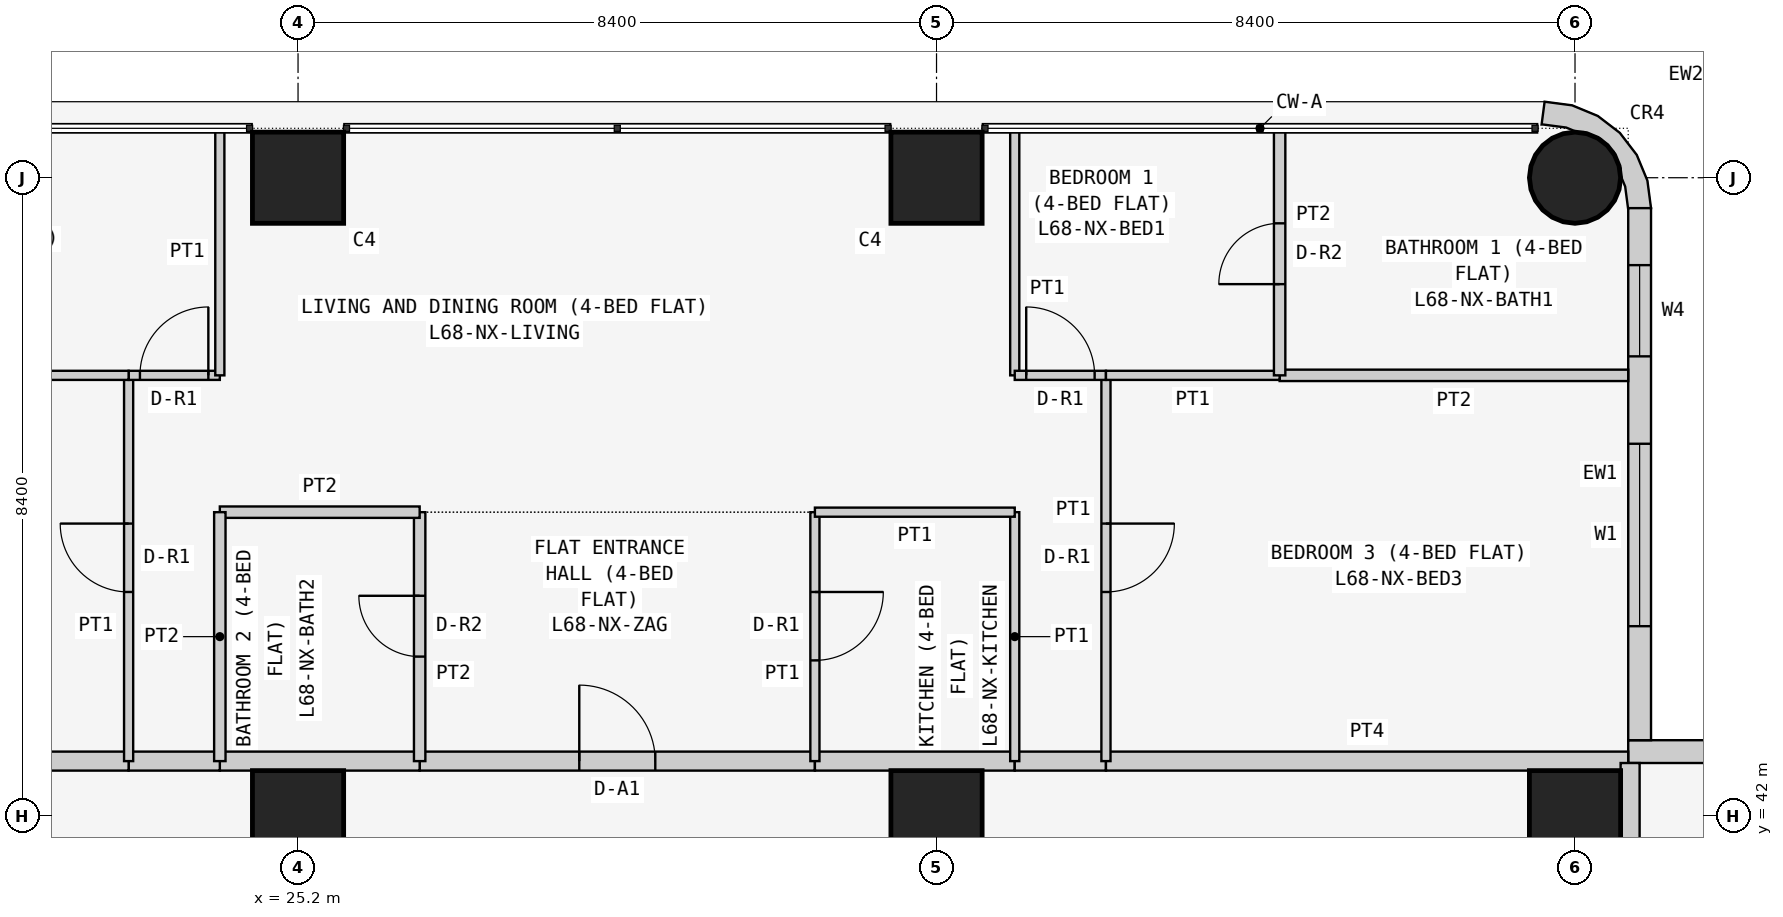
"""IFC4 building model, lengths in metres.
Left out: names, types, materials, properties, quantities, classifications, styles, units other than length and angle.
Written with IfcOpenShell. Run it as: python <this file> out.ifc"""

import sys

from ifc_helpers import new_model, si_unit, direction, frame, frame_2d, origin, origin_2d, place, context, subcontext, project, spatial, polyline, rectangle, circle, outline, extrude, element, fill, save


model = new_model("IFC4")
c1 = context("Model", 3, precision=1e-05, world=origin(), true_north=direction((0.0, 1.0)))
c2 = subcontext(c1, "Body", "Model", "MODEL_VIEW")
j1 = project(units=[si_unit("LENGTHUNIT", "METRE"), si_unit("PLANEANGLEUNIT", "RADIAN")], contexts=[c1])
p1 = place(None, origin())
s1 = spatial("IfcSite", under=j1, at=p1, CompositionType="ELEMENT")
p2 = place(p1, origin())
s2 = spatial("IfcBuilding", under=s1, at=p2, CompositionType="ELEMENT")
p3 = place(p2, frame((0.0, 0.0, 261.3)))
s3 = spatial("IfcBuildingStorey", under=s2, at=p3, CompositionType="ELEMENT", Elevation=261.3)
for number, where, z_axis, x_axis in (
    (1, (25.2, 42.0, 0.0), (0.0, 0.0, 1.0), (1.0, 0.0, 0.0)),
    (2, (25.2, 50.4, 0.0), (0.0, 0.0, 1.0), (1.0, 0.0, 0.0)),
    (3, (33.6, 42.0, 0.0), (0.0, 0.0, 1.0), (1.0, 0.0, 0.0)),
    (4, (33.6, 50.4, 0.0), (0.0, 0.0, 1.0), (1.0, 0.0, 0.0)),
    (5, (42.0, 42.0, 0.0), (0.0, 0.0, 1.0), (1.0, 0.0, 0.0)),
):
    element("IfcColumn", number, at=place(p3, frame(where, z_axis=z_axis, x_axis=x_axis)), inside=s3, PredefinedType="COLUMN", context=c2, shape_type="SweptSolid", body=[
        extrude(rectangle(XDim=1.2, YDim=1.2, at=origin_2d()), origin(), (0.0, 0.0, 1.0), 3.6),
    ])
p4 = place(p3, frame((42.0, 50.4, 0.0), z_axis=(0.0, 0.0, 1.0), x_axis=(1.0, 0.0, 0.0)))
e6 = element("IfcColumn", 6, at=p4, inside=s3, PredefinedType="COLUMN", context=c2, shape_type="SweptSolid", body=[
    extrude(circle(Radius=0.6, at=origin_2d()), origin(), (0.0, 0.0, 1.0), 3.6),
])
p5 = place(p3, frame((50.0, 42.85, 0.0), z_axis=(0.0, 0.0, 1.0), x_axis=(-1.0, 0.0, 0.0)))
e7 = element("IfcWall", 7, at=p5, inside=s3, PredefinedType="SOLIDWALL", context=c2, shape_type="SweptSolid", body=[
    extrude(rectangle(XDim=7.3, YDim=0.3, at=frame_2d((3.65, 0.0))), origin(), (0.0, 0.0, 1.0), 3.45),
])
p6 = place(p5, frame((3.1, 0.0, 0.9)))
e8 = element("IfcOpeningElement", 8, at=p6, cuts=e7, PredefinedType="OPENING", context=c2, shape_type="SweptSolid", body=[
    extrude(rectangle(XDim=2.4, YDim=1.5, at=frame_2d((1.2, 0.75))), frame((0.0, 0.16, 0.0), z_axis=(0.0, -1.0, 0.0), x_axis=(1.0, 0.0, 0.0)), (0.0, 0.0, 1.0), 0.32),
])
p7 = place(p5, frame((0.75, 0.0, 0.9)))
e9 = element("IfcOpeningElement", 9, at=p7, cuts=e7, PredefinedType="OPENING", context=c2, shape_type="SweptSolid", body=[
    extrude(rectangle(XDim=1.2, YDim=1.5, at=frame_2d((0.6, 0.75))), frame((0.0, 0.16, 0.0), z_axis=(0.0, -1.0, 0.0), x_axis=(1.0, 0.0, 0.0)), (0.0, 0.0, 1.0), 0.32),
])
p8 = place(p3, frame((42.85, 43.0, 0.0), z_axis=(0.0, 0.0, 1.0), x_axis=(0.0, 1.0, 0.0)))
e10 = element("IfcWall", 10, at=p8, inside=s3, PredefinedType="SOLIDWALL", context=c2, shape_type="SweptSolid", body=[
    extrude(rectangle(XDim=7.0, YDim=0.3, at=frame_2d((3.5, 0.0))), origin(), (0.0, 0.0, 1.0), 3.45),
])
p9 = place(p8, frame((1.5, 0.0, 0.9)))
e11 = element("IfcOpeningElement", 11, at=p9, cuts=e10, PredefinedType="OPENING", context=c2, shape_type="SweptSolid", body=[
    extrude(rectangle(XDim=2.4, YDim=1.5, at=frame_2d((1.2, 0.75))), frame((0.0, 0.16, 0.0), z_axis=(0.0, -1.0, 0.0), x_axis=(1.0, 0.0, 0.0)), (0.0, 0.0, 1.0), 0.32),
])
p10 = place(p8, frame((5.05, 0.0, 0.9)))
e12 = element("IfcOpeningElement", 12, at=p10, cuts=e10, PredefinedType="OPENING", context=c2, shape_type="SweptSolid", body=[
    extrude(rectangle(XDim=1.2, YDim=1.5, at=frame_2d((0.6, 0.75))), frame((0.0, 0.16, 0.0), z_axis=(0.0, -1.0, 0.0), x_axis=(1.0, 0.0, 0.0)), (0.0, 0.0, 1.0), 0.32),
])
p11 = place(p3, frame((42.576, 50.038, 0.0), z_axis=(0.0, 0.0, 1.0), x_axis=(0.707106781187, 0.707106781187, 0.0)))
e13 = element("IfcWall", 13, at=p11, inside=s3, PredefinedType="SOLIDWALL", context=c2, shape_type="SweptSolid", body=[
    extrude(outline(polyline([(0.233, 0.114), (0.047, -0.129), (0.033, -0.143), (0.273, -0.327), (0.495, -0.037), (0.635, 0.3), (0.683, 0.663), (0.635, 1.025), (0.495, 1.363), (0.273, 1.653), (0.033, 1.469), (0.047, 1.455), (0.233, 1.212), (0.292, 1.069), (0.358, 1.003), (0.449, 0.782), (0.449, 0.543), (0.358, 0.322), (0.292, 0.257), (0.233, 0.114)])), origin(), (0.0, 0.0, 1.0), 3.45),
])
p12 = place(p3, frame((26.8, 42.725, 0.0), z_axis=(0.0, 0.0, 1.0), x_axis=(1.0, 0.0, 0.0)))
e14 = element("IfcWall", 14, at=p12, inside=s3, PredefinedType="PARTITIONING", context=c2, shape_type="SweptSolid", body=[
    extrude(rectangle(XDim=5.2, YDim=0.25, at=frame_2d((2.6, 0.0))), origin(), (0.0, 0.0, 1.0), 3.45),
])
p13 = place(p12, frame((2.1, 0.0, 0.0)))
e15 = element("IfcOpeningElement", 15, at=p13, cuts=e14, PredefinedType="OPENING", context=c2, shape_type="SweptSolid", body=[
    extrude(rectangle(XDim=1.0, YDim=2.1, at=frame_2d((0.5, 1.05))), frame((0.0, 0.135, 0.0), z_axis=(0.0, -1.0, 0.0), x_axis=(1.0, 0.0, 0.0)), (0.0, 0.0, 1.0), 0.27),
])
p14 = place(p3, frame((24.171, 42.725, 0.0), z_axis=(0.0, 0.0, 1.0), x_axis=(1.0, 0.0, 0.0)))
e16 = element("IfcWall", 16, at=p14, inside=s3, PredefinedType="PARTITIONING", context=c2, shape_type="SweptSolid", body=[
    extrude(rectangle(XDim=2.629, YDim=0.25, at=frame_2d((1.314, 0.0))), origin(), (0.0, 0.0, 1.0), 3.45),
])
p15 = place(p3, frame((32.0, 42.725, 0.0), z_axis=(0.0, 0.0, 1.0), x_axis=(1.0, 0.0, 0.0)))
e17 = element("IfcWall", 17, at=p15, inside=s3, PredefinedType="PARTITIONING", context=c2, shape_type="SweptSolid", body=[
    extrude(rectangle(XDim=2.629, YDim=0.25, at=frame_2d((1.314, 0.0))), origin(), (0.0, 0.0, 1.0), 3.45),
])
p16 = place(p3, frame((22.971, 42.725, 0.0), z_axis=(0.0, 0.0, 1.0), x_axis=(1.0, 0.0, 0.0)))
e18 = element("IfcWall", 18, at=p16, inside=s3, PredefinedType="PARTITIONING", context=c2, shape_type="SweptSolid", body=[
    extrude(rectangle(XDim=1.2, YDim=0.25, at=frame_2d((0.6, 0.0))), origin(), (0.0, 0.0, 1.0), 3.45),
])
p17 = place(p3, frame((34.629, 42.725, 0.0), z_axis=(0.0, 0.0, 1.0), x_axis=(1.0, 0.0, 0.0)))
e19 = element("IfcWall", 19, at=p17, inside=s3, PredefinedType="PARTITIONING", context=c2, shape_type="SweptSolid", body=[
    extrude(rectangle(XDim=1.2, YDim=0.25, at=frame_2d((0.6, 0.0))), origin(), (0.0, 0.0, 1.0), 3.45),
])
for number, where, z_axis, x_axis in (
    (20, (16.1, 42.725, 0.0), (0.0, 0.0, 1.0), (1.0, 0.0, 0.0)),
    (21, (35.829, 42.725, 0.0), (0.0, 0.0, 1.0), (1.0, 0.0, 0.0)),
    (22, (42.725, 42.7, 0.0), (0.0, 0.0, 1.0), (0.0, -1.0, 0.0)),
):
    element("IfcWall", number, at=place(p3, frame(where, z_axis=z_axis, x_axis=x_axis)), inside=s3, PredefinedType="PARTITIONING", context=c2, shape_type="SweptSolid", body=[
        extrude(rectangle(XDim=6.871, YDim=0.25, at=frame_2d((3.436, 0.0))), origin(), (0.0, 0.0, 1.0), 3.45),
    ])
p18 = place(p3, frame((26.8, 46.0, 0.0), z_axis=(0.0, 0.0, 1.0), x_axis=(0.0, -1.0, 0.0)))
e23 = element("IfcWall", 23, at=p18, inside=s3, PredefinedType="PARTITIONING", context=c2, shape_type="SweptSolid", body=[
    extrude(rectangle(XDim=3.275, YDim=0.15, at=frame_2d((1.637, 0.0))), origin(), (0.0, 0.0, 1.0), 3.45),
])
p19 = place(p18, frame((1.1, 0.0, 0.0)))
e24 = element("IfcOpeningElement", 24, at=p19, cuts=e23, PredefinedType="OPENING", context=c2, shape_type="SweptSolid", body=[
    extrude(rectangle(XDim=0.8, YDim=2.1, at=frame_2d((0.4, 1.05))), frame((0.0, 0.085, 0.0), z_axis=(0.0, -1.0, 0.0), x_axis=(1.0, 0.0, 0.0)), (0.0, 0.0, 1.0), 0.17),
])
p20 = place(p3, frame((32.0, 42.725, 0.0), z_axis=(0.0, 0.0, 1.0), x_axis=(0.0, 1.0, 0.0)))
e25 = element("IfcWall", 25, at=p20, inside=s3, PredefinedType="PARTITIONING", context=c2, shape_type="SweptSolid", body=[
    extrude(rectangle(XDim=3.275, YDim=0.12, at=frame_2d((1.637, 0.0))), origin(), (0.0, 0.0, 1.0), 3.45),
])
p21 = place(p20, frame((1.325, 0.0, 0.0)))
e26 = element("IfcOpeningElement", 26, at=p21, cuts=e25, PredefinedType="OPENING", context=c2, shape_type="SweptSolid", body=[
    extrude(rectangle(XDim=0.9, YDim=2.1, at=frame_2d((0.45, 1.05))), frame((0.0, 0.07, 0.0), z_axis=(0.0, -1.0, 0.0), x_axis=(1.0, 0.0, 0.0)), (0.0, 0.0, 1.0), 0.14),
])
p22 = place(p3, frame((26.8, 46.0, 0.0), z_axis=(0.0, 0.0, 1.0), x_axis=(-1.0, 0.0, 0.0)))
e27 = element("IfcWall", 27, at=p22, inside=s3, PredefinedType="PARTITIONING", context=c2, shape_type="SweptSolid", body=[
    extrude(rectangle(XDim=2.629, YDim=0.15, at=frame_2d((1.314, 0.0))), origin(), (0.0, 0.0, 1.0), 3.45),
])
p23 = place(p3, frame((24.171, 46.0, 0.0), z_axis=(0.0, 0.0, 1.0), x_axis=(0.0, -1.0, 0.0)))
e28 = element("IfcWall", 28, at=p23, inside=s3, PredefinedType="PARTITIONING", context=c2, shape_type="SweptSolid", body=[
    extrude(rectangle(XDim=3.275, YDim=0.15, at=frame_2d((1.637, 0.0))), origin(), (0.0, 0.0, 1.0), 3.45),
])
p24 = place(p3, frame((34.629, 42.725, 0.0), z_axis=(0.0, 0.0, 1.0), x_axis=(0.0, 1.0, 0.0)))
e29 = element("IfcWall", 29, at=p24, inside=s3, PredefinedType="PARTITIONING", context=c2, shape_type="SweptSolid", body=[
    extrude(rectangle(XDim=3.275, YDim=0.12, at=frame_2d((1.637, 0.0))), origin(), (0.0, 0.0, 1.0), 3.45),
])
p25 = place(p3, frame((34.629, 46.0, 0.0), z_axis=(0.0, 0.0, 1.0), x_axis=(-1.0, 0.0, 0.0)))
e30 = element("IfcWall", 30, at=p25, inside=s3, PredefinedType="PARTITIONING", context=c2, shape_type="SweptSolid", body=[
    extrude(rectangle(XDim=2.629, YDim=0.12, at=frame_2d((1.314, 0.0))), origin(), (0.0, 0.0, 1.0), 3.45),
])
p26 = place(p3, frame((22.971, 42.725, 0.0), z_axis=(0.0, 0.0, 1.0), x_axis=(0.0, 1.0, 0.0)))
e31 = element("IfcWall", 31, at=p26, inside=s3, PredefinedType="PARTITIONING", context=c2, shape_type="SweptSolid", body=[
    extrude(rectangle(XDim=5.075, YDim=0.12, at=frame_2d((2.538, 0.0))), origin(), (0.0, 0.0, 1.0), 3.45),
])
p27 = place(p26, frame((2.225, 0.0, 0.0)))
e32 = element("IfcOpeningElement", 32, at=p27, cuts=e31, PredefinedType="OPENING", context=c2, shape_type="SweptSolid", body=[
    extrude(rectangle(XDim=0.9, YDim=2.1, at=frame_2d((0.45, 1.05))), frame((0.0, 0.07, 0.0), z_axis=(0.0, -1.0, 0.0), x_axis=(1.0, 0.0, 0.0)), (0.0, 0.0, 1.0), 0.14),
])
p28 = place(p3, frame((22.971, 47.8, 0.0), z_axis=(0.0, 0.0, 1.0), x_axis=(1.0, 0.0, 0.0)))
e33 = element("IfcWall", 33, at=p28, inside=s3, PredefinedType="PARTITIONING", context=c2, shape_type="SweptSolid", body=[
    extrude(rectangle(XDim=1.2, YDim=0.12, at=frame_2d((0.6, 0.0))), origin(), (0.0, 0.0, 1.0), 3.45),
])
p29 = place(p28, frame((0.149, 0.0, 0.0)))
e34 = element("IfcOpeningElement", 34, at=p29, cuts=e33, PredefinedType="OPENING", context=c2, shape_type="SweptSolid", body=[
    extrude(rectangle(XDim=0.9, YDim=2.1, at=frame_2d((0.45, 1.05))), frame((0.0, 0.07, 0.0), z_axis=(0.0, -1.0, 0.0), x_axis=(1.0, 0.0, 0.0)), (0.0, 0.0, 1.0), 0.14),
])
p30 = place(p3, frame((24.171, 47.8, 0.0), z_axis=(0.0, 0.0, 1.0), x_axis=(0.0, 1.0, 0.0)))
e35 = element("IfcWall", 35, at=p30, inside=s3, PredefinedType="PARTITIONING", context=c2, shape_type="SweptSolid", body=[
    extrude(rectangle(XDim=3.25, YDim=0.12, at=frame_2d((1.625, 0.0))), origin(), (0.0, 0.0, 1.0), 3.45),
])
p31 = place(p3, frame((35.829, 47.8, 0.0), z_axis=(0.0, 0.0, 1.0), x_axis=(0.0, -1.0, 0.0)))
e36 = element("IfcWall", 36, at=p31, inside=s3, PredefinedType="PARTITIONING", context=c2, shape_type="SweptSolid", body=[
    extrude(rectangle(XDim=5.075, YDim=0.12, at=frame_2d((2.538, 0.0))), origin(), (0.0, 0.0, 1.0), 3.45),
])
p32 = place(p31, frame((1.95, 0.0, 0.0)))
e37 = element("IfcOpeningElement", 37, at=p32, cuts=e36, PredefinedType="OPENING", context=c2, shape_type="SweptSolid", body=[
    extrude(rectangle(XDim=0.9, YDim=2.1, at=frame_2d((0.45, 1.05))), frame((0.0, 0.07, 0.0), z_axis=(0.0, -1.0, 0.0), x_axis=(1.0, 0.0, 0.0)), (0.0, 0.0, 1.0), 0.14),
])
p33 = place(p3, frame((34.629, 51.05, 0.0), z_axis=(0.0, 0.0, 1.0), x_axis=(0.0, -1.0, 0.0)))
e38 = element("IfcWall", 38, at=p33, inside=s3, PredefinedType="PARTITIONING", context=c2, shape_type="SweptSolid", body=[
    extrude(rectangle(XDim=3.25, YDim=0.12, at=frame_2d((1.625, 0.0))), origin(), (0.0, 0.0, 1.0), 3.45),
])
p34 = place(p3, frame((34.629, 47.8, 0.0), z_axis=(0.0, 0.0, 1.0), x_axis=(1.0, 0.0, 0.0)))
e39 = element("IfcWall", 39, at=p34, inside=s3, PredefinedType="PARTITIONING", context=c2, shape_type="SweptSolid", body=[
    extrude(rectangle(XDim=1.2, YDim=0.12, at=frame_2d((0.6, 0.0))), origin(), (0.0, 0.0, 1.0), 3.45),
])
p35 = place(p34, frame((0.151, 0.0, 0.0)))
e40 = element("IfcOpeningElement", 40, at=p35, cuts=e39, PredefinedType="OPENING", context=c2, shape_type="SweptSolid", body=[
    extrude(rectangle(XDim=0.9, YDim=2.1, at=frame_2d((0.45, 1.05))), frame((0.0, 0.07, 0.0), z_axis=(0.0, -1.0, 0.0), x_axis=(1.0, 0.0, 0.0)), (0.0, 0.0, 1.0), 0.14),
])
p36 = place(p3, frame((22.971, 47.8, 0.0), z_axis=(0.0, 0.0, 1.0), x_axis=(-1.0, 0.0, 0.0)))
e41 = element("IfcWall", 41, at=p36, inside=s3, PredefinedType="PARTITIONING", context=c2, shape_type="SweptSolid", body=[
    extrude(rectangle(XDim=6.871, YDim=0.12, at=frame_2d((3.436, 0.0))), origin(), (0.0, 0.0, 1.0), 3.45),
])
p37 = place(p3, frame((42.7, 47.8, 0.0), z_axis=(0.0, 0.0, 1.0), x_axis=(-1.0, 0.0, 0.0)))
e42 = element("IfcWall", 42, at=p37, inside=s3, PredefinedType="PARTITIONING", context=c2, shape_type="SweptSolid", body=[
    extrude(rectangle(XDim=4.586, YDim=0.15, at=frame_2d((2.293, 0.0))), origin(), (0.0, 0.0, 1.0), 3.45),
])
p38 = place(p3, frame((38.114, 47.8, 0.0), z_axis=(0.0, 0.0, 1.0), x_axis=(-1.0, 0.0, 0.0)))
e43 = element("IfcWall", 43, at=p38, inside=s3, PredefinedType="PARTITIONING", context=c2, shape_type="SweptSolid", body=[
    extrude(rectangle(XDim=2.285, YDim=0.12, at=frame_2d((1.143, 0.0))), origin(), (0.0, 0.0, 1.0), 3.45),
])
p39 = place(p3, frame((38.114, 51.05, 0.0), z_axis=(0.0, 0.0, 1.0), x_axis=(0.0, -1.0, 0.0)))
e44 = element("IfcWall", 44, at=p39, inside=s3, PredefinedType="PARTITIONING", context=c2, shape_type="SweptSolid", body=[
    extrude(rectangle(XDim=3.25, YDim=0.15, at=frame_2d((1.625, 0.0))), origin(), (0.0, 0.0, 1.0), 3.45),
])
p40 = place(p39, frame((1.25, 0.0, 0.0)))
e45 = element("IfcOpeningElement", 45, at=p40, cuts=e44, PredefinedType="OPENING", context=c2, shape_type="SweptSolid", body=[
    extrude(rectangle(XDim=0.8, YDim=2.1, at=frame_2d((0.4, 1.05))), frame((0.0, 0.085, 0.0), z_axis=(0.0, -1.0, 0.0), x_axis=(1.0, 0.0, 0.0)), (0.0, 0.0, 1.0), 0.17),
])
p41 = place(p9, origin())
e46 = element("IfcWindow", 46, at=p41, inside=s3, PartitioningType="SINGLE_PANEL", PredefinedType="WINDOW", context=c2, shape_type="SweptSolid", body=[
    extrude(rectangle(XDim=2.4, YDim=1.5, at=frame_2d((1.2, 0.75))), frame((0.0, 0.03, 0.0), z_axis=(0.0, -1.0, 0.0), x_axis=(1.0, 0.0, 0.0)), (0.0, 0.0, 1.0), 0.06),
])
fill(e11, e46)
p42 = place(p10, origin())
e47 = element("IfcWindow", 47, at=p42, inside=s3, PartitioningType="SINGLE_PANEL", PredefinedType="WINDOW", context=c2, shape_type="SweptSolid", body=[
    extrude(rectangle(XDim=1.2, YDim=1.5, at=frame_2d((0.6, 0.75))), frame((0.0, 0.03, 0.0), z_axis=(0.0, -1.0, 0.0), x_axis=(1.0, 0.0, 0.0)), (0.0, 0.0, 1.0), 0.06),
])
fill(e12, e47)
p43 = place(p13, origin())
e48 = element("IfcDoor", 48, at=p43, inside=s3, OperationType="SINGLE_SWING_LEFT", PredefinedType="DOOR", context=c2, shape_type="SweptSolid", body=[
    extrude(rectangle(XDim=1.0, YDim=2.1, at=frame_2d((0.5, 1.05))), frame((0.0, 0.025, 0.0), z_axis=(0.0, -1.0, 0.0), x_axis=(1.0, 0.0, 0.0)), (0.0, 0.0, 1.0), 0.05),
])
fill(e15, e48)
p44 = place(p19, frame((0.8, 0.0, 0.0), z_axis=(0.0, 0.0, 1.0), x_axis=(-1.0, 0.0, 0.0)))
e49 = element("IfcDoor", 49, at=p44, inside=s3, OperationType="SINGLE_SWING_RIGHT", PredefinedType="DOOR", context=c2, shape_type="SweptSolid", body=[
    extrude(rectangle(XDim=0.8, YDim=2.1, at=frame_2d((0.4, 1.05))), frame((0.0, 0.025, 0.0), z_axis=(0.0, -1.0, 0.0), x_axis=(1.0, 0.0, 0.0)), (0.0, 0.0, 1.0), 0.05),
])
fill(e24, e49)
p45 = place(p21, frame((0.9, 0.0, 0.0), z_axis=(0.0, 0.0, 1.0), x_axis=(-1.0, 0.0, 0.0)))
e50 = element("IfcDoor", 50, at=p45, inside=s3, OperationType="SINGLE_SWING_LEFT", PredefinedType="DOOR", context=c2, shape_type="SweptSolid", body=[
    extrude(rectangle(XDim=0.9, YDim=2.1, at=frame_2d((0.45, 1.05))), frame((0.0, 0.025, 0.0), z_axis=(0.0, -1.0, 0.0), x_axis=(1.0, 0.0, 0.0)), (0.0, 0.0, 1.0), 0.05),
])
fill(e26, e50)
p46 = place(p27, origin())
e51 = element("IfcDoor", 51, at=p46, inside=s3, OperationType="SINGLE_SWING_RIGHT", PredefinedType="DOOR", context=c2, shape_type="SweptSolid", body=[
    extrude(rectangle(XDim=0.9, YDim=2.1, at=frame_2d((0.45, 1.05))), frame((0.0, 0.025, 0.0), z_axis=(0.0, -1.0, 0.0), x_axis=(1.0, 0.0, 0.0)), (0.0, 0.0, 1.0), 0.05),
])
fill(e32, e51)
p47 = place(p29, origin())
e52 = element("IfcDoor", 52, at=p47, inside=s3, OperationType="SINGLE_SWING_RIGHT", PredefinedType="DOOR", context=c2, shape_type="SweptSolid", body=[
    extrude(rectangle(XDim=0.9, YDim=2.1, at=frame_2d((0.45, 1.05))), frame((0.0, 0.025, 0.0), z_axis=(0.0, -1.0, 0.0), x_axis=(1.0, 0.0, 0.0)), (0.0, 0.0, 1.0), 0.05),
])
fill(e34, e52)
p48 = place(p32, origin())
e53 = element("IfcDoor", 53, at=p48, inside=s3, OperationType="SINGLE_SWING_LEFT", PredefinedType="DOOR", context=c2, shape_type="SweptSolid", body=[
    extrude(rectangle(XDim=0.9, YDim=2.1, at=frame_2d((0.45, 1.05))), frame((0.0, 0.025, 0.0), z_axis=(0.0, -1.0, 0.0), x_axis=(1.0, 0.0, 0.0)), (0.0, 0.0, 1.0), 0.05),
])
fill(e37, e53)
p49 = place(p35, origin())
e54 = element("IfcDoor", 54, at=p49, inside=s3, OperationType="SINGLE_SWING_LEFT", PredefinedType="DOOR", context=c2, shape_type="SweptSolid", body=[
    extrude(rectangle(XDim=0.9, YDim=2.1, at=frame_2d((0.45, 1.05))), frame((0.0, 0.025, 0.0), z_axis=(0.0, -1.0, 0.0), x_axis=(1.0, 0.0, 0.0)), (0.0, 0.0, 1.0), 0.05),
])
fill(e40, e54)
p50 = place(p40, frame((0.8, 0.0, 0.0), z_axis=(0.0, 0.0, 1.0), x_axis=(-1.0, 0.0, 0.0)))
e55 = element("IfcDoor", 55, at=p50, inside=s3, OperationType="SINGLE_SWING_LEFT", PredefinedType="DOOR", context=c2, shape_type="SweptSolid", body=[
    extrude(rectangle(XDim=0.8, YDim=2.1, at=frame_2d((0.4, 1.05))), frame((0.0, 0.025, 0.0), z_axis=(0.0, -1.0, 0.0), x_axis=(1.0, 0.0, 0.0)), (0.0, 0.0, 1.0), 0.05),
])
fill(e45, e55)
save(model, sys.argv[1])
